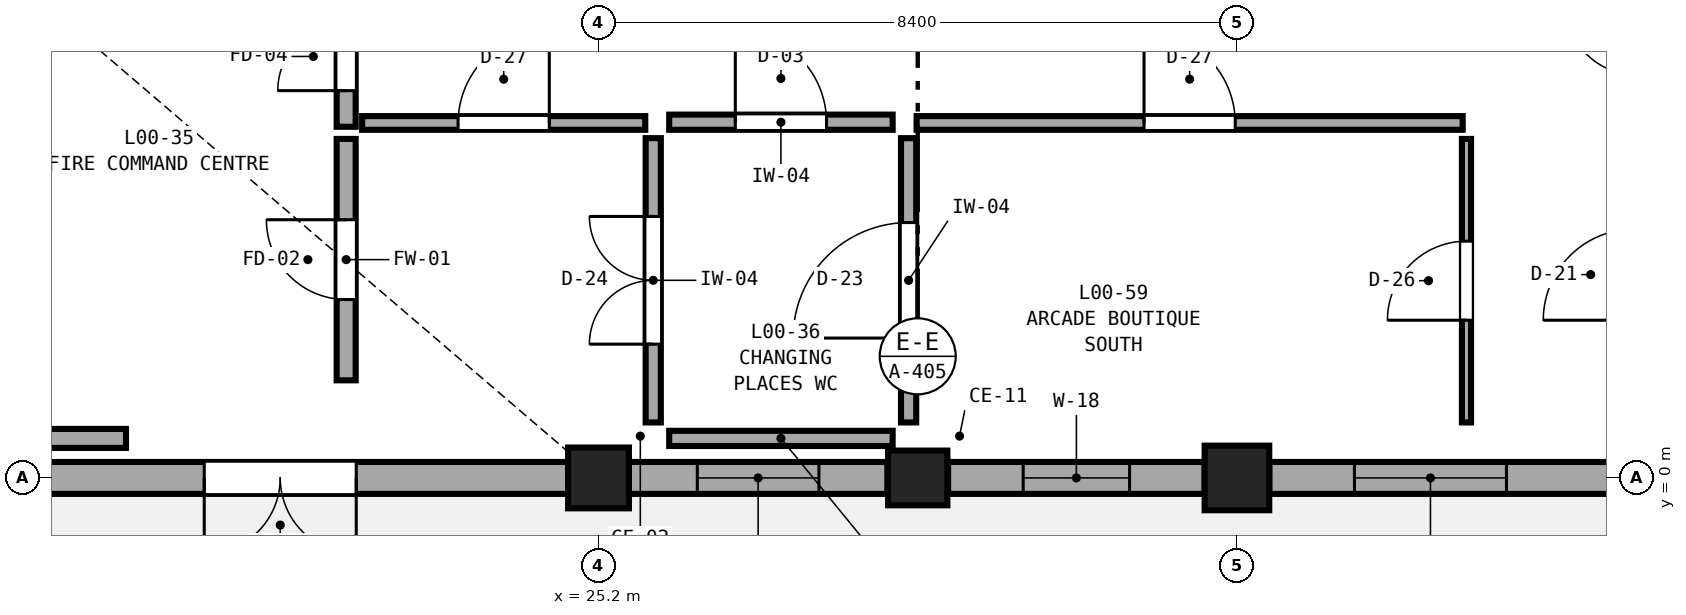
"""IFC4 building model, lengths in metres.
Left out: names, types, materials, properties, quantities, classifications, styles, units other than length and angle.
Written with IfcOpenShell. Run it as: python <this file> out.ifc"""

import sys

from ifc_helpers import new_model, si_unit, direction, frame, frame_2d, origin, origin_2d, place, context, subcontext, project, spatial, rectangle, extrude, element, fill, save


model = new_model("IFC4")
c1 = context("Model", 3, precision=1e-05, world=origin(), true_north=direction((0.0, 1.0)))
c2 = subcontext(c1, "Body", "Model", "MODEL_VIEW")
j1 = project(units=[si_unit("LENGTHUNIT", "METRE"), si_unit("PLANEANGLEUNIT", "RADIAN")], contexts=[c1])
p1 = place(None, origin())
s1 = spatial("IfcSite", under=j1, at=p1, CompositionType="ELEMENT")
p2 = place(p1, origin())
s2 = spatial("IfcBuilding", under=s1, at=p2, CompositionType="ELEMENT")
p3 = place(p2, origin())
s3 = spatial("IfcBuildingStorey", under=s2, at=p3, CompositionType="ELEMENT", Elevation=0.0)
p4 = place(p3, frame((25.2, 0.0, 0.0), z_axis=(0.0, 0.0, 1.0), x_axis=(1.0, 0.0, 0.0)))
e1 = element("IfcColumn", 1, at=p4, inside=s3, PredefinedType="COLUMN", context=c2, shape_type="SweptSolid", body=[
    extrude(rectangle(XDim=0.8, YDim=0.8, at=origin_2d()), origin(), (0.0, 0.0, 1.0), 5.4),
])
p5 = place(p3, frame((33.6, 0.0, 0.0), z_axis=(0.0, 0.0, 1.0), x_axis=(1.0, 0.0, 0.0)))
e2 = element("IfcColumn", 2, at=p5, inside=s3, PredefinedType="COLUMN", context=c2, shape_type="SweptSolid", body=[
    extrude(rectangle(XDim=0.85, YDim=0.85, at=origin_2d()), origin(), (0.0, 0.0, 1.0), 5.4),
])
p6 = place(p3, frame((29.4, 0.0, 0.0), z_axis=(0.0, 0.0, 1.0), x_axis=(1.0, 0.0, 0.0)))
e3 = element("IfcColumn", 3, at=p6, inside=s3, PredefinedType="PILASTER", context=c2, shape_type="SweptSolid", body=[
    extrude(rectangle(XDim=0.78, YDim=0.72, at=origin_2d()), origin(), (0.0, 0.0, 1.0), 5.4),
])
p7 = place(p3, frame((24.8, 0.0, 0.0), z_axis=(0.0, 0.0, 1.0), x_axis=(-1.0, 0.0, 0.0)))
e4 = element("IfcWall", 4, at=p7, inside=s3, PredefinedType="SOLIDWALL", context=c2, shape_type="SweptSolid", body=[
    extrude(rectangle(XDim=7.575, YDim=0.42, at=frame_2d((3.788, 0.0))), origin(), (0.0, 0.0, 1.0), 4.53),
])
p8 = place(p7, frame((2.788, 0.0, 0.0)))
e5 = element("IfcOpeningElement", 5, at=p8, cuts=e4, PredefinedType="OPENING", context=c2, shape_type="SweptSolid", body=[
    extrude(rectangle(XDim=2.0, YDim=2.4, at=frame_2d((1.0, 1.2))), frame((0.0, 0.23, 0.0), z_axis=(0.0, -1.0, 0.0), x_axis=(1.0, 0.0, 0.0)), (0.0, 0.0, 1.0), 0.46),
])
p9 = place(p3, frame((33.175, 0.0, 0.0), z_axis=(0.0, 0.0, 1.0), x_axis=(-1.0, 0.0, 0.0)))
e6 = element("IfcWall", 6, at=p9, inside=s3, PredefinedType="SOLIDWALL", context=c2, shape_type="SweptSolid", body=[
    extrude(rectangle(XDim=3.375, YDim=0.42, at=frame_2d((1.688, 0.0))), origin(), (0.0, 0.0, 1.0), 4.53),
])
p10 = place(p9, frame((0.988, 0.0, 0.75)))
e7 = element("IfcOpeningElement", 7, at=p10, cuts=e6, PredefinedType="OPENING", context=c2, shape_type="SweptSolid", body=[
    extrude(rectangle(XDim=1.4, YDim=2.26, at=frame_2d((0.7, 1.13))), frame((0.0, 0.23, 0.0), z_axis=(0.0, -1.0, 0.0), x_axis=(1.0, 0.0, 0.0)), (0.0, 0.0, 1.0), 0.46),
])
p11 = place(p3, frame((29.0, 0.0, 0.0), z_axis=(0.0, 0.0, 1.0), x_axis=(-1.0, 0.0, 0.0)))
e8 = element("IfcWall", 8, at=p11, inside=s3, PredefinedType="SOLIDWALL", context=c2, shape_type="SweptSolid", body=[
    extrude(rectangle(XDim=3.4, YDim=0.42, at=frame_2d((1.7, 0.0))), origin(), (0.0, 0.0, 1.0), 4.53),
])
p12 = place(p11, frame((0.9, 0.0, 0.75)))
e9 = element("IfcOpeningElement", 9, at=p12, cuts=e8, PredefinedType="OPENING", context=c2, shape_type="SweptSolid", body=[
    extrude(rectangle(XDim=1.6, YDim=2.26, at=frame_2d((0.8, 1.13))), frame((0.0, 0.23, 0.0), z_axis=(0.0, -1.0, 0.0), x_axis=(1.0, 0.0, 0.0)), (0.0, 0.0, 1.0), 0.46),
])
p13 = place(p3, frame((41.6, 0.0, 0.0), z_axis=(0.0, 0.0, 1.0), x_axis=(-1.0, 0.0, 0.0)))
e10 = element("IfcWall", 10, at=p13, inside=s3, PredefinedType="SOLIDWALL", context=c2, shape_type="SweptSolid", body=[
    extrude(rectangle(XDim=7.575, YDim=0.42, at=frame_2d((3.788, 0.0))), origin(), (0.0, 0.0, 1.0), 4.53),
])
p14 = place(p13, frame((1.221, 0.0, 0.75)))
e11 = element("IfcOpeningElement", 11, at=p14, cuts=e10, PredefinedType="OPENING", context=c2, shape_type="SweptSolid", body=[
    extrude(rectangle(XDim=1.8, YDim=2.26, at=frame_2d((0.9, 1.13))), frame((0.0, 0.23, 0.0), z_axis=(0.0, -1.0, 0.0), x_axis=(1.0, 0.0, 0.0)), (0.0, 0.0, 1.0), 0.46),
])
p15 = place(p13, frame((4.454, 0.0, 0.75)))
e12 = element("IfcOpeningElement", 12, at=p15, cuts=e10, PredefinedType="OPENING", context=c2, shape_type="SweptSolid", body=[
    extrude(rectangle(XDim=2.0, YDim=2.26, at=frame_2d((1.0, 1.13))), frame((0.0, 0.23, 0.0), z_axis=(0.0, -1.0, 0.0), x_axis=(1.0, 0.0, 0.0)), (0.0, 0.0, 1.0), 0.46),
])
p16 = place(p3, frame((29.385, 4.67, 0.0), z_axis=(0.0, 0.0, 1.0), x_axis=(1.0, 0.0, 0.0)))
e13 = element("IfcWall", 13, at=p16, inside=s3, PredefinedType="PARTITIONING", context=c2, shape_type="SweptSolid", body=[
    extrude(rectangle(XDim=7.185, YDim=0.18, at=frame_2d((3.593, 0.0))), origin(), (0.0, 0.0, 1.0), 5.08),
])
p17 = place(p16, frame((2.992, 0.0, 0.0)))
e14 = element("IfcOpeningElement", 14, at=p17, cuts=e13, PredefinedType="OPENING", context=c2, shape_type="SweptSolid", body=[
    extrude(rectangle(XDim=1.2, YDim=2.37, at=frame_2d((0.6, 1.185))), frame((0.0, 0.11, 0.0), z_axis=(0.0, -1.0, 0.0), x_axis=(1.0, 0.0, 0.0)), (0.0, 0.0, 1.0), 0.22),
])
p18 = place(p3, frame((29.28, 0.73, 0.0), z_axis=(0.0, 0.0, 1.0), x_axis=(0.0, 1.0, 0.0)))
e15 = element("IfcWall", 15, at=p18, inside=s3, PredefinedType="PLUMBINGWALL", context=c2, shape_type="SweptSolid", body=[
    extrude(rectangle(XDim=3.74, YDim=0.2, at=frame_2d((1.87, 0.0))), origin(), (0.0, 0.0, 1.0), 5.08),
])
p19 = place(p18, frame((1.11, 0.0, 0.0)))
e16 = element("IfcOpeningElement", 16, at=p19, cuts=e15, PredefinedType="OPENING", context=c2, shape_type="SweptSolid", body=[
    extrude(rectangle(XDim=1.52, YDim=2.29, at=frame_2d((0.76, 1.145))), frame((0.0, 0.12, 0.0), z_axis=(0.0, -1.0, 0.0), x_axis=(1.0, 0.0, 0.0)), (0.0, 0.0, 1.0), 0.24),
])
p20 = place(p3, frame((25.92, 0.73, 0.0), z_axis=(0.0, 0.0, 1.0), x_axis=(0.0, 1.0, 0.0)))
e17 = element("IfcWall", 17, at=p20, inside=s3, PredefinedType="PLUMBINGWALL", context=c2, shape_type="SweptSolid", body=[
    extrude(rectangle(XDim=3.74, YDim=0.2, at=frame_2d((1.87, 0.0))), origin(), (0.0, 0.0, 1.0), 5.08),
])
p21 = place(p20, frame((1.03, 0.0, 0.0)))
e18 = element("IfcOpeningElement", 18, at=p21, cuts=e17, PredefinedType="OPENING", context=c2, shape_type="SweptSolid", body=[
    extrude(rectangle(XDim=1.68, YDim=2.29, at=frame_2d((0.84, 1.145))), frame((0.0, 0.12, 0.0), z_axis=(0.0, -1.0, 0.0), x_axis=(1.0, 0.0, 0.0)), (0.0, 0.0, 1.0), 0.24),
])
p22 = place(p3, frame((21.88, 1.284, 0.0), z_axis=(0.0, 0.0, 1.0), x_axis=(0.0, 1.0, 0.0)))
e19 = element("IfcWall", 19, at=p22, inside=s3, PredefinedType="SOLIDWALL", context=c2, shape_type="SweptSolid", body=[
    extrude(rectangle(XDim=3.176, YDim=0.25, at=frame_2d((1.588, 0.0))), origin(), (0.0, 0.0, 1.0), 5.08),
])
p23 = place(p22, frame((1.063, 0.0, 0.0)))
e20 = element("IfcOpeningElement", 20, at=p23, cuts=e19, PredefinedType="OPENING", context=c2, shape_type="SweptSolid", body=[
    extrude(rectangle(XDim=1.05, YDim=2.15, at=frame_2d((0.525, 1.075))), frame((0.0, 0.145, 0.0), z_axis=(0.0, -1.0, 0.0), x_axis=(1.0, 0.0, 0.0)), (0.0, 0.0, 1.0), 0.29),
])
p24 = place(p3, frame((36.62, 0.73, 0.0), z_axis=(0.0, 0.0, 1.0), x_axis=(0.0, 1.0, 0.0)))
e21 = element("IfcWall", 21, at=p24, inside=s3, PredefinedType="PARTITIONING", context=c2, shape_type="SweptSolid", body=[
    extrude(rectangle(XDim=3.73, YDim=0.12, at=frame_2d((1.865, 0.0))), origin(), (0.0, 0.0, 1.0), 5.08),
])
p25 = place(p24, frame((1.345, 0.0, 0.0)))
e22 = element("IfcOpeningElement", 22, at=p25, cuts=e21, PredefinedType="OPENING", context=c2, shape_type="SweptSolid", body=[
    extrude(rectangle(XDim=1.04, YDim=2.37, at=frame_2d((0.52, 1.185))), frame((0.0, 0.08, 0.0), z_axis=(0.0, -1.0, 0.0), x_axis=(1.0, 0.0, 0.0)), (0.0, 0.0, 1.0), 0.16),
])
p26 = place(p3, frame((22.09, 4.67, 0.0), z_axis=(0.0, 0.0, 1.0), x_axis=(1.0, 0.0, 0.0)))
e23 = element("IfcWall", 23, at=p26, inside=s3, PredefinedType="PARTITIONING", context=c2, shape_type="SweptSolid", body=[
    extrude(rectangle(XDim=3.725, YDim=0.18, at=frame_2d((1.862, 0.0))), origin(), (0.0, 0.0, 1.0), 5.08),
])
p27 = place(p26, frame((1.262, 0.0, 0.0)))
e24 = element("IfcOpeningElement", 24, at=p27, cuts=e23, PredefinedType="OPENING", context=c2, shape_type="SweptSolid", body=[
    extrude(rectangle(XDim=1.2, YDim=2.37, at=frame_2d((0.6, 1.185))), frame((0.0, 0.11, 0.0), z_axis=(0.0, -1.0, 0.0), x_axis=(1.0, 0.0, 0.0)), (0.0, 0.0, 1.0), 0.22),
])
p28 = place(p3, frame((26.13, 4.68, 0.0), z_axis=(0.0, 0.0, 1.0), x_axis=(1.0, 0.0, 0.0)))
e25 = element("IfcWall", 25, at=p28, inside=s3, PredefinedType="PLUMBINGWALL", context=c2, shape_type="SweptSolid", body=[
    extrude(rectangle(XDim=2.94, YDim=0.2, at=frame_2d((1.47, 0.0))), origin(), (0.0, 0.0, 1.0), 5.08),
])
p29 = place(p28, frame((0.87, 0.0, 0.0)))
e26 = element("IfcOpeningElement", 26, at=p29, cuts=e25, PredefinedType="OPENING", context=c2, shape_type="SweptSolid", body=[
    extrude(rectangle(XDim=1.2, YDim=2.05, at=frame_2d((0.6, 1.025))), frame((0.0, 0.12, 0.0), z_axis=(0.0, -1.0, 0.0), x_axis=(1.0, 0.0, 0.0)), (0.0, 0.0, 1.0), 0.24),
])
p30 = place(p3, frame((26.13, 0.52, 0.0), z_axis=(0.0, 0.0, 1.0), x_axis=(1.0, 0.0, 0.0)))
e27 = element("IfcWall", 27, at=p30, inside=s3, PredefinedType="PLUMBINGWALL", context=c2, shape_type="SweptSolid", body=[
    extrude(rectangle(XDim=2.94, YDim=0.2, at=frame_2d((1.47, 0.0))), origin(), (0.0, 0.0, 1.0), 4.53),
])
p31 = place(p3, frame((21.88, 4.62, 0.0), z_axis=(0.0, 0.0, 1.0), x_axis=(0.0, 1.0, 0.0)))
e28 = element("IfcWall", 28, at=p31, inside=s3, PredefinedType="SOLIDWALL", context=c2, shape_type="SweptSolid", body=[
    extrude(rectangle(XDim=1.85, YDim=0.25, at=frame_2d((0.925, 0.0))), origin(), (0.0, 0.0, 1.0), 5.08),
])
p32 = place(p31, frame((0.475, 0.0, 0.0)))
e29 = element("IfcOpeningElement", 29, at=p32, cuts=e28, PredefinedType="OPENING", context=c2, shape_type="SweptSolid", body=[
    extrude(rectangle(XDim=0.9, YDim=2.1, at=frame_2d((0.45, 1.05))), frame((0.0, 0.145, 0.0), z_axis=(0.0, -1.0, 0.0), x_axis=(1.0, 0.0, 0.0)), (0.0, 0.0, 1.0), 0.29),
])
p33 = place(p3, frame((17.73, 0.52, 0.0), z_axis=(0.0, 0.0, 1.0), x_axis=(1.0, 0.0, 0.0)))
e30 = element("IfcWall", 30, at=p33, inside=s3, PredefinedType="SOLIDWALL", context=c2, shape_type="SweptSolid", body=[
    extrude(rectangle(XDim=1.253, YDim=0.25, at=frame_2d((0.626, 0.0))), origin(), (0.0, 0.0, 1.0), 4.53),
])
p34 = place(p8, origin())
e31 = element("IfcDoor", 31, at=p34, inside=s3, OperationType="DOUBLE_DOOR_SINGLE_SWING", PredefinedType="DOOR", context=c2, shape_type="SweptSolid", body=[
    extrude(rectangle(XDim=2.0, YDim=2.4, at=frame_2d((1.0, 1.2))), frame((0.0, 0.025, 0.0), z_axis=(0.0, -1.0, 0.0), x_axis=(1.0, 0.0, 0.0)), (0.0, 0.0, 1.0), 0.05),
])
fill(e5, e31)
p35 = place(p10, origin())
e32 = element("IfcWindow", 32, at=p35, inside=s3, PartitioningType="DOUBLE_PANEL_VERTICAL", PredefinedType="WINDOW", context=c2, shape_type="SweptSolid", body=[
    extrude(rectangle(XDim=1.4, YDim=2.26, at=frame_2d((0.7, 1.13))), frame((0.0, 0.03, 0.0), z_axis=(0.0, -1.0, 0.0), x_axis=(1.0, 0.0, 0.0)), (0.0, 0.0, 1.0), 0.06),
])
fill(e7, e32)
p36 = place(p12, origin())
e33 = element("IfcWindow", 33, at=p36, inside=s3, PartitioningType="DOUBLE_PANEL_VERTICAL", PredefinedType="WINDOW", context=c2, shape_type="SweptSolid", body=[
    extrude(rectangle(XDim=1.6, YDim=2.26, at=frame_2d((0.8, 1.13))), frame((0.0, 0.03, 0.0), z_axis=(0.0, -1.0, 0.0), x_axis=(1.0, 0.0, 0.0)), (0.0, 0.0, 1.0), 0.06),
])
fill(e9, e33)
p37 = place(p15, origin())
e34 = element("IfcWindow", 34, at=p37, inside=s3, PartitioningType="TRIPLE_PANEL_VERTICAL", PredefinedType="WINDOW", context=c2, shape_type="SweptSolid", body=[
    extrude(rectangle(XDim=2.0, YDim=2.26, at=frame_2d((1.0, 1.13))), frame((0.0, 0.03, 0.0), z_axis=(0.0, -1.0, 0.0), x_axis=(1.0, 0.0, 0.0)), (0.0, 0.0, 1.0), 0.06),
])
fill(e12, e34)
p38 = place(p17, frame((1.2, 0.0, 0.0), z_axis=(0.0, 0.0, 1.0), x_axis=(-1.0, 0.0, 0.0)))
e35 = element("IfcDoor", 35, at=p38, inside=s3, OperationType="SINGLE_SWING_LEFT", PredefinedType="DOOR", context=c2, shape_type="SweptSolid", body=[
    extrude(rectangle(XDim=1.2, YDim=2.37, at=frame_2d((0.6, 1.185))), frame((0.0, 0.025, 0.0), z_axis=(0.0, -1.0, 0.0), x_axis=(1.0, 0.0, 0.0)), (0.0, 0.0, 1.0), 0.05),
])
fill(e14, e35)
p39 = place(p19, origin())
e36 = element("IfcDoor", 36, at=p39, inside=s3, OperationType="SINGLE_SWING_LEFT", PredefinedType="DOOR", context=c2, shape_type="SweptSolid", body=[
    extrude(rectangle(XDim=1.52, YDim=2.29, at=frame_2d((0.76, 1.145))), frame((0.0, 0.025, 0.0), z_axis=(0.0, -1.0, 0.0), x_axis=(1.0, 0.0, 0.0)), (0.0, 0.0, 1.0), 0.05),
])
fill(e16, e36)
p40 = place(p21, origin())
e37 = element("IfcDoor", 37, at=p40, inside=s3, OperationType="DOUBLE_DOOR_SINGLE_SWING", PredefinedType="DOOR", context=c2, shape_type="SweptSolid", body=[
    extrude(rectangle(XDim=1.68, YDim=2.29, at=frame_2d((0.84, 1.145))), frame((0.0, 0.025, 0.0), z_axis=(0.0, -1.0, 0.0), x_axis=(1.0, 0.0, 0.0)), (0.0, 0.0, 1.0), 0.05),
])
fill(e18, e37)
p41 = place(p23, origin())
e38 = element("IfcDoor", 38, at=p41, inside=s3, OperationType="SINGLE_SWING_RIGHT", PredefinedType="DOOR", context=c2, shape_type="SweptSolid", body=[
    extrude(rectangle(XDim=1.05, YDim=2.15, at=frame_2d((0.525, 1.075))), frame((0.0, 0.025, 0.0), z_axis=(0.0, -1.0, 0.0), x_axis=(1.0, 0.0, 0.0)), (0.0, 0.0, 1.0), 0.05),
])
fill(e20, e38)
p42 = place(p25, origin())
e39 = element("IfcDoor", 39, at=p42, inside=s3, OperationType="SINGLE_SWING_LEFT", PredefinedType="DOOR", context=c2, shape_type="SweptSolid", body=[
    extrude(rectangle(XDim=1.04, YDim=2.37, at=frame_2d((0.52, 1.185))), frame((0.0, 0.025, 0.0), z_axis=(0.0, -1.0, 0.0), x_axis=(1.0, 0.0, 0.0)), (0.0, 0.0, 1.0), 0.05),
])
fill(e22, e39)
p43 = place(p27, frame((1.2, 0.0, 0.0), z_axis=(0.0, 0.0, 1.0), x_axis=(-1.0, 0.0, 0.0)))
e40 = element("IfcDoor", 40, at=p43, inside=s3, OperationType="SINGLE_SWING_RIGHT", PredefinedType="DOOR", context=c2, shape_type="SweptSolid", body=[
    extrude(rectangle(XDim=1.2, YDim=2.37, at=frame_2d((0.6, 1.185))), frame((0.0, 0.025, 0.0), z_axis=(0.0, -1.0, 0.0), x_axis=(1.0, 0.0, 0.0)), (0.0, 0.0, 1.0), 0.05),
])
fill(e24, e40)
p44 = place(p29, frame((1.2, 0.0, 0.0), z_axis=(0.0, 0.0, 1.0), x_axis=(-1.0, 0.0, 0.0)))
e41 = element("IfcDoor", 41, at=p44, inside=s3, OperationType="SINGLE_SWING_LEFT", PredefinedType="DOOR", context=c2, shape_type="SweptSolid", body=[
    extrude(rectangle(XDim=1.2, YDim=2.05, at=frame_2d((0.6, 1.025))), frame((0.0, 0.025, 0.0), z_axis=(0.0, -1.0, 0.0), x_axis=(1.0, 0.0, 0.0)), (0.0, 0.0, 1.0), 0.05),
])
fill(e26, e41)
p45 = place(p32, origin())
e42 = element("IfcDoor", 42, at=p45, inside=s3, OperationType="SINGLE_SWING_LEFT", PredefinedType="DOOR", context=c2, shape_type="SweptSolid", body=[
    extrude(rectangle(XDim=0.9, YDim=2.1, at=frame_2d((0.45, 1.05))), frame((0.0, 0.025, 0.0), z_axis=(0.0, -1.0, 0.0), x_axis=(1.0, 0.0, 0.0)), (0.0, 0.0, 1.0), 0.05),
])
fill(e29, e42)
save(model, sys.argv[1])
